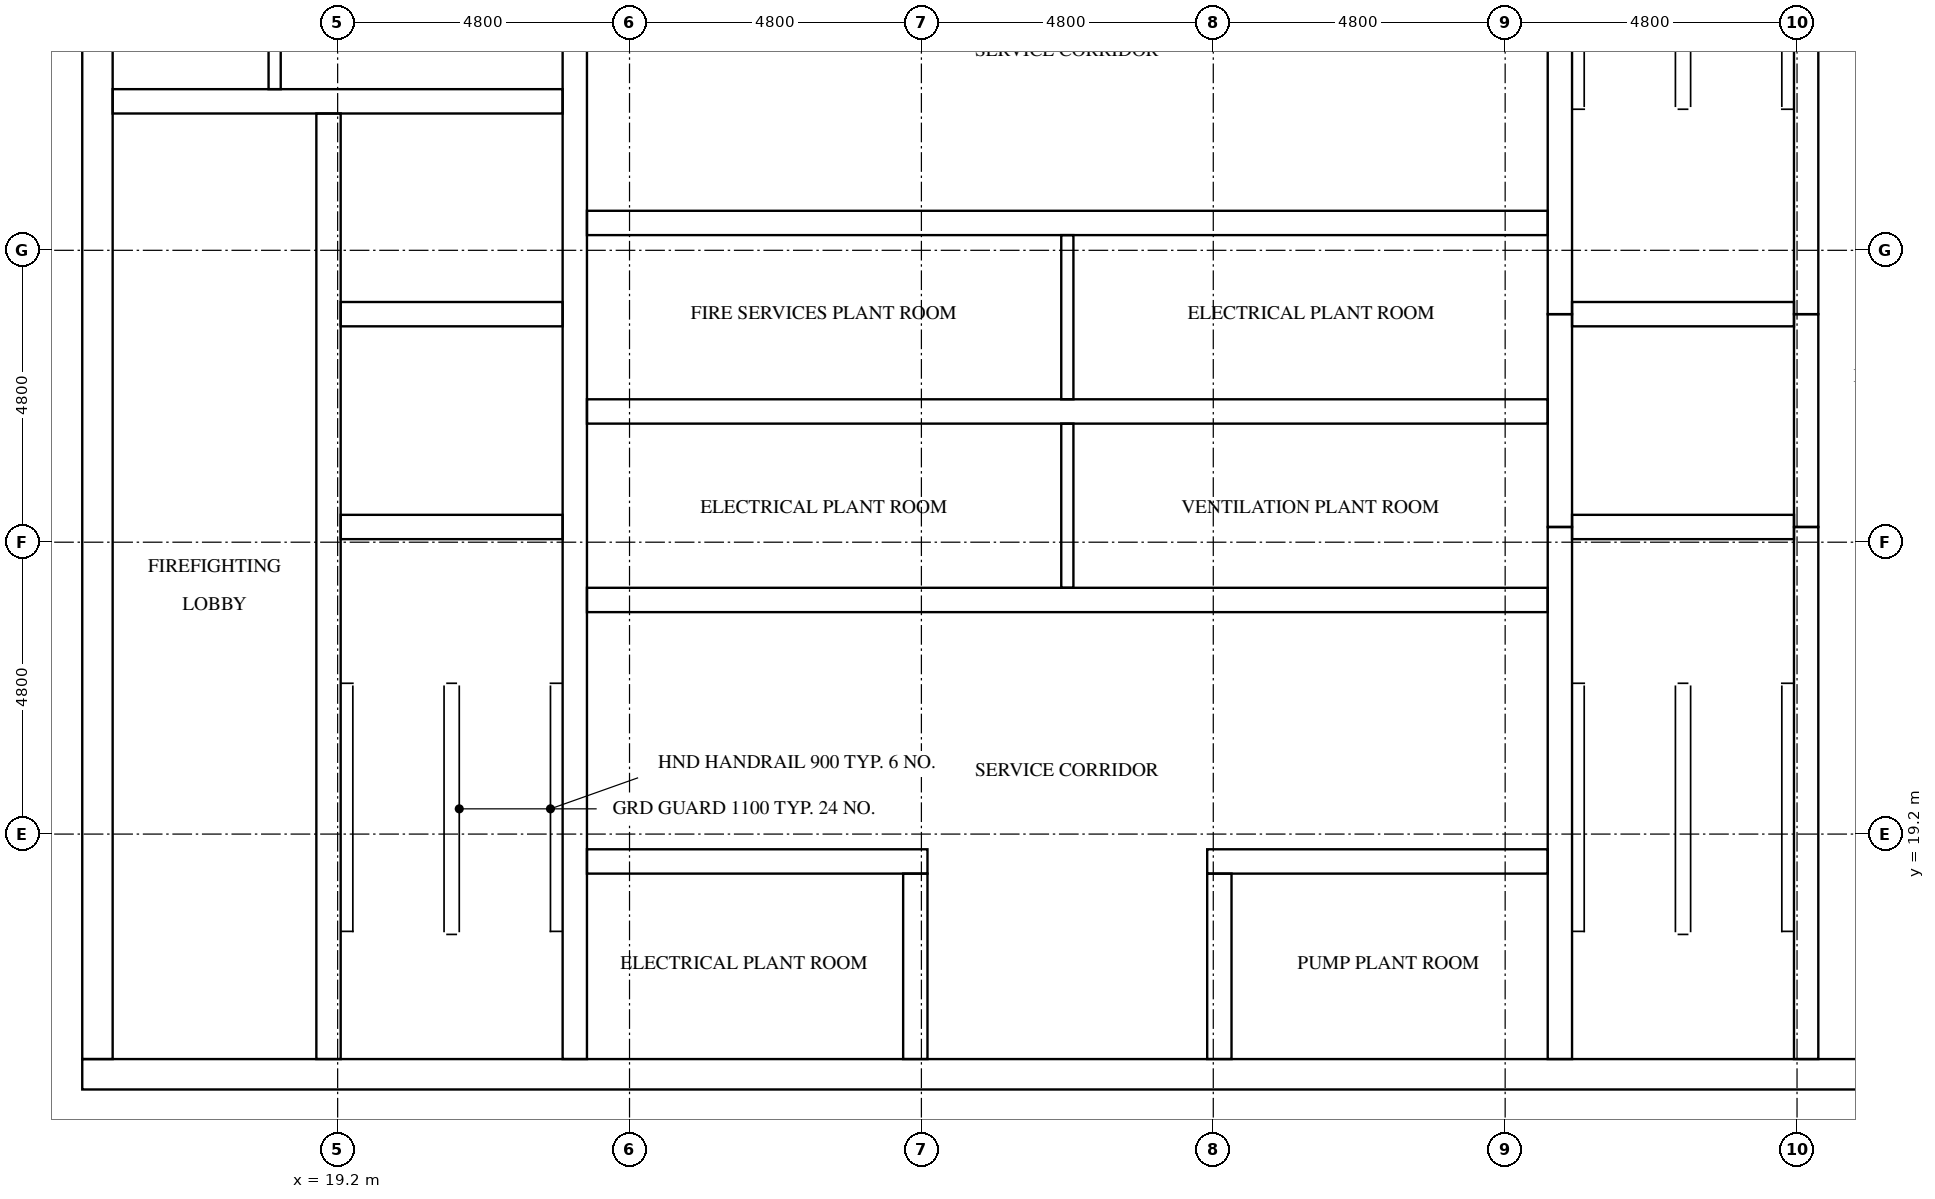
"""IFC4 building model, lengths in metres.
Left out: names, types, materials, properties, quantities, classifications, styles, units other than length and angle.
Written with IfcOpenShell. Run it as: python <this file> out.ifc"""

import sys

from ifc_helpers import new_model, si_unit, direction, frame, frame_2d, origin, place, context, subcontext, project, spatial, rectangle, extrude, element, fill, save


model = new_model("IFC4")
c1 = context("Model", 3, precision=1e-05, world=origin(), true_north=direction((0.0, 1.0)))
c2 = subcontext(c1, "Body", "Model", "MODEL_VIEW")
j1 = project(units=[si_unit("LENGTHUNIT", "METRE"), si_unit("PLANEANGLEUNIT", "RADIAN")], contexts=[c1])
p1 = place(None, origin())
s1 = spatial("IfcSite", under=j1, at=p1, CompositionType="ELEMENT")
p2 = place(p1, origin())
s2 = spatial("IfcBuilding", under=s1, at=p2, CompositionType="ELEMENT")
p3 = place(p2, frame((0.0, 0.0, 301.1)))
s3 = spatial("IfcBuildingStorey", under=s2, at=p3, CompositionType="ELEMENT", Elevation=301.1)
p4 = place(p3, frame((15.0, 15.25, 0.0), z_axis=(0.0, 0.0, 1.0), x_axis=(1.0, 0.0, 0.0)))
e1 = element("IfcWall", 1, at=p4, inside=s3, PredefinedType="SHEAR", context=c2, shape_type="SweptSolid", body=[
    extrude(rectangle(XDim=32.4, YDim=0.5, at=frame_2d((16.2, 0.0))), origin(), (0.0, 0.0, 1.0), 4.4),
])
p5 = place(p4, frame((15.3, 0.0, 0.0)))
e2 = element("IfcOpeningElement", 2, at=p5, cuts=e1, PredefinedType="OPENING", context=c2, shape_type="SweptSolid", body=[
    extrude(rectangle(XDim=1.8, YDim=2.1, at=frame_2d((0.9, 1.05))), frame((0.0, 0.26, 0.0), z_axis=(0.0, -1.0, 0.0), x_axis=(1.0, 0.0, 0.0)), (0.0, 0.0, 1.0), 0.52),
])
p6 = place(p3, frame((15.25, 15.5, 0.0), z_axis=(0.0, 0.0, 1.0), x_axis=(0.0, 1.0, 0.0)))
e3 = element("IfcWall", 3, at=p6, inside=s3, PredefinedType="SHEAR", context=c2, shape_type="SweptSolid", body=[
    extrude(rectangle(XDim=21.8, YDim=0.5, at=frame_2d((10.9, 0.0))), origin(), (0.0, 0.0, 1.0), 4.4),
])
p7 = place(p6, frame((5.26, 0.0, 0.0)))
e4 = element("IfcOpeningElement", 4, at=p7, cuts=e3, PredefinedType="OPENING", context=c2, shape_type="SweptSolid", body=[
    extrude(rectangle(XDim=1.2, YDim=2.1, at=frame_2d((0.6, 1.05))), frame((0.0, 0.26, 0.0), z_axis=(0.0, -1.0, 0.0), x_axis=(1.0, 0.0, 0.0)), (0.0, 0.0, 1.0), 0.52),
])
p8 = place(p3, frame((19.05, 15.5, 0.0), z_axis=(0.0, 0.0, 1.0), x_axis=(0.0, 1.0, 0.0)))
e5 = element("IfcWall", 5, at=p8, inside=s3, PredefinedType="SHEAR", context=c2, shape_type="SweptSolid", body=[
    extrude(rectangle(XDim=15.55, YDim=0.4, at=frame_2d((7.775, 0.0))), origin(), (0.0, 0.0, 1.0), 4.4),
])
p9 = place(p8, frame((9.95, 0.0, 0.0)))
e6 = element("IfcOpeningElement", 6, at=p9, cuts=e5, PredefinedType="OPENING", context=c2, shape_type="SweptSolid", body=[
    extrude(rectangle(XDim=1.1, YDim=2.1, at=frame_2d((0.55, 1.05))), frame((0.0, 0.21, 0.0), z_axis=(0.0, -1.0, 0.0), x_axis=(1.0, 0.0, 0.0)), (0.0, 0.0, 1.0), 0.42),
])
p10 = place(p8, frame((13.45, 0.0, 0.0)))
e7 = element("IfcOpeningElement", 7, at=p10, cuts=e5, PredefinedType="OPENING", context=c2, shape_type="SweptSolid", body=[
    extrude(rectangle(XDim=1.1, YDim=2.1, at=frame_2d((0.55, 1.05))), frame((0.0, 0.21, 0.0), z_axis=(0.0, -1.0, 0.0), x_axis=(1.0, 0.0, 0.0)), (0.0, 0.0, 1.0), 0.42),
])
p11 = place(p8, frame((0.7, 0.0, 0.0)))
e8 = element("IfcOpeningElement", 8, at=p11, cuts=e5, PredefinedType="OPENING", context=c2, shape_type="SweptSolid", body=[
    extrude(rectangle(XDim=1.2, YDim=2.1, at=frame_2d((0.6, 1.05))), frame((0.0, 0.21, 0.0), z_axis=(0.0, -1.0, 0.0), x_axis=(1.0, 0.0, 0.0)), (0.0, 0.0, 1.0), 0.42),
])
p12 = place(p3, frame((23.1, 15.5, 0.0), z_axis=(0.0, 0.0, 1.0), x_axis=(0.0, 1.0, 0.0)))
e9 = element("IfcWall", 9, at=p12, inside=s3, PredefinedType="SHEAR", context=c2, shape_type="SweptSolid", body=[
    extrude(rectangle(XDim=21.8, YDim=0.4, at=frame_2d((10.9, 0.0))), origin(), (0.0, 0.0, 1.0), 4.4),
])
p13 = place(p3, frame((39.3, 15.5, 0.0), z_axis=(0.0, 0.0, 1.0), x_axis=(0.0, 1.0, 0.0)))
e10 = element("IfcWall", 10, at=p13, inside=s3, PredefinedType="SHEAR", context=c2, shape_type="SweptSolid", body=[
    extrude(rectangle(XDim=8.75, YDim=0.4, at=frame_2d((4.375, 0.0))), origin(), (0.0, 0.0, 1.0), 4.4),
])
p14 = place(p3, frame((39.3, 24.25, 0.0), z_axis=(0.0, 0.0, 1.0), x_axis=(0.0, 1.0, 0.0)))
e11 = element("IfcWall", 11, at=p14, inside=s3, PredefinedType="SHEAR", context=c2, shape_type="SweptSolid", body=[
    extrude(rectangle(XDim=3.5, YDim=0.4, at=frame_2d((1.75, 0.0))), origin(), (0.0, 0.0, 1.0), 4.4),
])
p15 = place(p3, frame((39.3, 27.75, 0.0), z_axis=(0.0, 0.0, 1.0), x_axis=(0.0, 1.0, 0.0)))
e12 = element("IfcWall", 12, at=p15, inside=s3, PredefinedType="SHEAR", context=c2, shape_type="SweptSolid", body=[
    extrude(rectangle(XDim=9.55, YDim=0.4, at=frame_2d((4.775, 0.0))), origin(), (0.0, 0.0, 1.0), 4.4),
])
p16 = place(p3, frame((43.35, 15.5, 0.0), z_axis=(0.0, 0.0, 1.0), x_axis=(0.0, 1.0, 0.0)))
e13 = element("IfcWall", 13, at=p16, inside=s3, PredefinedType="SHEAR", context=c2, shape_type="SweptSolid", body=[
    extrude(rectangle(XDim=8.75, YDim=0.4, at=frame_2d((4.375, 0.0))), origin(), (0.0, 0.0, 1.0), 4.4),
])
p17 = place(p16, frame((0.7, 0.0, 0.0)))
e14 = element("IfcOpeningElement", 14, at=p17, cuts=e13, PredefinedType="OPENING", context=c2, shape_type="SweptSolid", body=[
    extrude(rectangle(XDim=1.2, YDim=2.1, at=frame_2d((0.6, 1.05))), frame((0.0, 0.21, 0.0), z_axis=(0.0, -1.0, 0.0), x_axis=(1.0, 0.0, 0.0)), (0.0, 0.0, 1.0), 0.42),
])
p18 = place(p3, frame((43.35, 24.25, 0.0), z_axis=(0.0, 0.0, 1.0), x_axis=(0.0, 1.0, 0.0)))
e15 = element("IfcWall", 15, at=p18, inside=s3, PredefinedType="SHEAR", context=c2, shape_type="SweptSolid", body=[
    extrude(rectangle(XDim=3.5, YDim=0.4, at=frame_2d((1.75, 0.0))), origin(), (0.0, 0.0, 1.0), 4.4),
])
p19 = place(p18, frame((1.2, 0.0, 0.0)))
e16 = element("IfcOpeningElement", 16, at=p19, cuts=e15, PredefinedType="OPENING", context=c2, shape_type="SweptSolid", body=[
    extrude(rectangle(XDim=1.1, YDim=2.1, at=frame_2d((0.55, 1.05))), frame((0.0, 0.21, 0.0), z_axis=(0.0, -1.0, 0.0), x_axis=(1.0, 0.0, 0.0)), (0.0, 0.0, 1.0), 0.42),
])
p20 = place(p3, frame((43.35, 27.75, 0.0), z_axis=(0.0, 0.0, 1.0), x_axis=(0.0, 1.0, 0.0)))
e17 = element("IfcWall", 17, at=p20, inside=s3, PredefinedType="SHEAR", context=c2, shape_type="SweptSolid", body=[
    extrude(rectangle(XDim=9.55, YDim=0.4, at=frame_2d((4.775, 0.0))), origin(), (0.0, 0.0, 1.0), 4.4),
])
p21 = place(p20, frame((7.65, 0.0, 0.0)))
e18 = element("IfcOpeningElement", 18, at=p21, cuts=e17, PredefinedType="OPENING", context=c2, shape_type="SweptSolid", body=[
    extrude(rectangle(XDim=1.2, YDim=2.1, at=frame_2d((0.6, 1.05))), frame((0.0, 0.21, 0.0), z_axis=(0.0, -1.0, 0.0), x_axis=(1.0, 0.0, 0.0)), (0.0, 0.0, 1.0), 0.42),
])
for number, where, z_axis, x_axis in (
    (19, (19.25, 24.25, 0.0), (0.0, 0.0, 1.0), (1.0, 0.0, 0.0)),
    (20, (19.25, 27.75, 0.0), (0.0, 0.0, 1.0), (1.0, 0.0, 0.0)),
):
    element("IfcWall", number, at=place(p3, frame(where, z_axis=z_axis, x_axis=x_axis)), inside=s3, PredefinedType="SHEAR", context=c2, shape_type="SweptSolid", body=[
        extrude(rectangle(XDim=3.65, YDim=0.4, at=frame_2d((1.825, 0.0))), origin(), (0.0, 0.0, 1.0), 4.4),
    ])
p22 = place(p3, frame((15.5, 31.25, 0.0), z_axis=(0.0, 0.0, 1.0), x_axis=(1.0, 0.0, 0.0)))
e21 = element("IfcWall", 21, at=p22, inside=s3, PredefinedType="SHEAR", context=c2, shape_type="SweptSolid", body=[
    extrude(rectangle(XDim=7.4, YDim=0.4, at=frame_2d((3.7, 0.0))), origin(), (0.0, 0.0, 1.0), 4.4),
])
for number, where, z_axis, x_axis in (
    (22, (39.5, 24.25, 0.0), (0.0, 0.0, 1.0), (1.0, 0.0, 0.0)),
    (23, (39.5, 27.75, 0.0), (0.0, 0.0, 1.0), (1.0, 0.0, 0.0)),
):
    element("IfcWall", number, at=place(p3, frame(where, z_axis=z_axis, x_axis=x_axis)), inside=s3, PredefinedType="SHEAR", context=c2, shape_type="SweptSolid", body=[
        extrude(rectangle(XDim=3.65, YDim=0.4, at=frame_2d((1.825, 0.0))), origin(), (0.0, 0.0, 1.0), 4.4),
    ])
p23 = place(p3, frame((23.3, 18.75, 0.0), z_axis=(0.0, 0.0, 1.0), x_axis=(1.0, 0.0, 0.0)))
e24 = element("IfcWall", 24, at=p23, inside=s3, PredefinedType="SHEAR", context=c2, shape_type="SweptSolid", body=[
    extrude(rectangle(XDim=5.6, YDim=0.4, at=frame_2d((2.8, 0.0))), origin(), (0.0, 0.0, 1.0), 4.4),
])
p24 = place(p23, frame((2.1, 0.0, 0.0)))
e25 = element("IfcOpeningElement", 25, at=p24, cuts=e24, PredefinedType="OPENING", context=c2, shape_type="SweptSolid", body=[
    extrude(rectangle(XDim=1.0, YDim=2.1, at=frame_2d((0.5, 1.05))), frame((0.0, 0.21, 0.0), z_axis=(0.0, -1.0, 0.0), x_axis=(1.0, 0.0, 0.0)), (0.0, 0.0, 1.0), 0.42),
])
p25 = place(p3, frame((33.5, 18.75, 0.0), z_axis=(0.0, 0.0, 1.0), x_axis=(1.0, 0.0, 0.0)))
e26 = element("IfcWall", 26, at=p25, inside=s3, PredefinedType="SHEAR", context=c2, shape_type="SweptSolid", body=[
    extrude(rectangle(XDim=5.6, YDim=0.4, at=frame_2d((2.8, 0.0))), origin(), (0.0, 0.0, 1.0), 4.4),
])
p26 = place(p25, frame((2.5, 0.0, 0.0)))
e27 = element("IfcOpeningElement", 27, at=p26, cuts=e26, PredefinedType="OPENING", context=c2, shape_type="SweptSolid", body=[
    extrude(rectangle(XDim=1.0, YDim=2.1, at=frame_2d((0.5, 1.05))), frame((0.0, 0.21, 0.0), z_axis=(0.0, -1.0, 0.0), x_axis=(1.0, 0.0, 0.0)), (0.0, 0.0, 1.0), 0.42),
])
p27 = place(p3, frame((23.3, 23.05, 0.0), z_axis=(0.0, 0.0, 1.0), x_axis=(1.0, 0.0, 0.0)))
e28 = element("IfcWall", 28, at=p27, inside=s3, PredefinedType="SHEAR", context=c2, shape_type="SweptSolid", body=[
    extrude(rectangle(XDim=15.8, YDim=0.4, at=frame_2d((7.9, 0.0))), origin(), (0.0, 0.0, 1.0), 4.4),
])
p28 = place(p27, frame((3.4, 0.0, 0.0)))
e29 = element("IfcOpeningElement", 29, at=p28, cuts=e28, PredefinedType="OPENING", context=c2, shape_type="SweptSolid", body=[
    extrude(rectangle(XDim=1.0, YDim=2.1, at=frame_2d((0.5, 1.05))), frame((0.0, 0.21, 0.0), z_axis=(0.0, -1.0, 0.0), x_axis=(1.0, 0.0, 0.0)), (0.0, 0.0, 1.0), 0.42),
])
p29 = place(p27, frame((11.4, 0.0, 0.0)))
e30 = element("IfcOpeningElement", 30, at=p29, cuts=e28, PredefinedType="OPENING", context=c2, shape_type="SweptSolid", body=[
    extrude(rectangle(XDim=1.0, YDim=2.1, at=frame_2d((0.5, 1.05))), frame((0.0, 0.21, 0.0), z_axis=(0.0, -1.0, 0.0), x_axis=(1.0, 0.0, 0.0)), (0.0, 0.0, 1.0), 0.42),
])
p30 = place(p3, frame((23.3, 26.15, 0.0), z_axis=(0.0, 0.0, 1.0), x_axis=(1.0, 0.0, 0.0)))
e31 = element("IfcWall", 31, at=p30, inside=s3, PredefinedType="SHEAR", context=c2, shape_type="SweptSolid", body=[
    extrude(rectangle(XDim=15.8, YDim=0.4, at=frame_2d((7.9, 0.0))), origin(), (0.0, 0.0, 1.0), 4.4),
])
p31 = place(p3, frame((23.3, 29.25, 0.0), z_axis=(0.0, 0.0, 1.0), x_axis=(1.0, 0.0, 0.0)))
e32 = element("IfcWall", 32, at=p31, inside=s3, PredefinedType="SHEAR", context=c2, shape_type="SweptSolid", body=[
    extrude(rectangle(XDim=15.8, YDim=0.4, at=frame_2d((7.9, 0.0))), origin(), (0.0, 0.0, 1.0), 4.4),
])
p32 = place(p31, frame((3.4, 0.0, 0.0)))
e33 = element("IfcOpeningElement", 33, at=p32, cuts=e32, PredefinedType="OPENING", context=c2, shape_type="SweptSolid", body=[
    extrude(rectangle(XDim=1.0, YDim=2.1, at=frame_2d((0.5, 1.05))), frame((0.0, 0.21, 0.0), z_axis=(0.0, -1.0, 0.0), x_axis=(1.0, 0.0, 0.0)), (0.0, 0.0, 1.0), 0.42),
])
p33 = place(p31, frame((11.4, 0.0, 0.0)))
e34 = element("IfcOpeningElement", 34, at=p33, cuts=e32, PredefinedType="OPENING", context=c2, shape_type="SweptSolid", body=[
    extrude(rectangle(XDim=1.0, YDim=2.1, at=frame_2d((0.5, 1.05))), frame((0.0, 0.21, 0.0), z_axis=(0.0, -1.0, 0.0), x_axis=(1.0, 0.0, 0.0)), (0.0, 0.0, 1.0), 0.42),
])
for number, where, z_axis, x_axis in (
    (35, (28.7, 15.5, 0.0), (0.0, 0.0, 1.0), (0.0, 1.0, 0.0)),
    (36, (33.7, 15.5, 0.0), (0.0, 0.0, 1.0), (0.0, 1.0, 0.0)),
):
    element("IfcWall", number, at=place(p3, frame(where, z_axis=z_axis, x_axis=x_axis)), inside=s3, PredefinedType="SHEAR", context=c2, shape_type="SweptSolid", body=[
        extrude(rectangle(XDim=3.05, YDim=0.4, at=frame_2d((1.525, 0.0))), origin(), (0.0, 0.0, 1.0), 4.4),
    ])
p34 = place(p3, frame((18.164, 31.45, 0.0), z_axis=(0.0, 0.0, 1.0), x_axis=(0.0, 1.0, 0.0)))
e37 = element("IfcWall", 37, at=p34, inside=s3, PredefinedType="PARTITIONING", context=c2, shape_type="SweptSolid", body=[
    extrude(rectangle(XDim=5.85, YDim=0.2, at=frame_2d((2.925, 0.0))), origin(), (0.0, 0.0, 1.0), 4.4),
])
for number, where, z_axis, x_axis in (
    (38, (31.2, 23.25, 0.0), (0.0, 0.0, 1.0), (0.0, 1.0, 0.0)),
    (39, (31.2, 26.35, 0.0), (0.0, 0.0, 1.0), (0.0, 1.0, 0.0)),
):
    element("IfcWall", number, at=place(p3, frame(where, z_axis=z_axis, x_axis=x_axis)), inside=s3, PredefinedType="PARTITIONING", context=c2, shape_type="SweptSolid", body=[
        extrude(rectangle(XDim=2.7, YDim=0.2, at=frame_2d((1.35, 0.0))), origin(), (0.0, 0.0, 1.0), 4.4),
    ])
p35 = place(p9, origin())
e40 = element("IfcDoor", 40, at=p35, inside=s3, OperationType="DOUBLE_DOOR_SLIDING", PredefinedType="DOOR", context=c2, shape_type="SweptSolid", body=[
    extrude(rectangle(XDim=1.1, YDim=2.1, at=frame_2d((0.55, 1.05))), frame((0.0, 0.025, 0.0), z_axis=(0.0, -1.0, 0.0), x_axis=(1.0, 0.0, 0.0)), (0.0, 0.0, 1.0), 0.05),
])
fill(e6, e40)
p36 = place(p10, origin())
e41 = element("IfcDoor", 41, at=p36, inside=s3, OperationType="DOUBLE_DOOR_SLIDING", PredefinedType="DOOR", context=c2, shape_type="SweptSolid", body=[
    extrude(rectangle(XDim=1.1, YDim=2.1, at=frame_2d((0.55, 1.05))), frame((0.0, 0.025, 0.0), z_axis=(0.0, -1.0, 0.0), x_axis=(1.0, 0.0, 0.0)), (0.0, 0.0, 1.0), 0.05),
])
fill(e7, e41)
p37 = place(p19, origin())
e42 = element("IfcDoor", 42, at=p37, inside=s3, OperationType="DOUBLE_DOOR_SLIDING", PredefinedType="DOOR", context=c2, shape_type="SweptSolid", body=[
    extrude(rectangle(XDim=1.1, YDim=2.1, at=frame_2d((0.55, 1.05))), frame((0.0, 0.025, 0.0), z_axis=(0.0, -1.0, 0.0), x_axis=(1.0, 0.0, 0.0)), (0.0, 0.0, 1.0), 0.05),
])
fill(e16, e42)
p38 = place(p11, frame((1.2, 0.0, 0.0), z_axis=(0.0, 0.0, 1.0), x_axis=(-1.0, 0.0, 0.0)))
e43 = element("IfcDoor", 43, at=p38, inside=s3, OperationType="SINGLE_SWING_RIGHT", PredefinedType="DOOR", context=c2, shape_type="SweptSolid", body=[
    extrude(rectangle(XDim=1.2, YDim=2.1, at=frame_2d((0.6, 1.05))), frame((0.0, 0.025, 0.0), z_axis=(0.0, -1.0, 0.0), x_axis=(1.0, 0.0, 0.0)), (0.0, 0.0, 1.0), 0.05),
])
fill(e8, e43)
p39 = place(p17, origin())
e44 = element("IfcDoor", 44, at=p39, inside=s3, OperationType="SINGLE_SWING_LEFT", PredefinedType="DOOR", context=c2, shape_type="SweptSolid", body=[
    extrude(rectangle(XDim=1.2, YDim=2.1, at=frame_2d((0.6, 1.05))), frame((0.0, 0.025, 0.0), z_axis=(0.0, -1.0, 0.0), x_axis=(1.0, 0.0, 0.0)), (0.0, 0.0, 1.0), 0.05),
])
fill(e14, e44)
p40 = place(p5, frame((1.8, 0.0, 0.0), z_axis=(0.0, 0.0, 1.0), x_axis=(-1.0, 0.0, 0.0)))
e45 = element("IfcDoor", 45, at=p40, inside=s3, OperationType="DOUBLE_DOOR_SINGLE_SWING", PredefinedType="DOOR", context=c2, shape_type="SweptSolid", body=[
    extrude(rectangle(XDim=1.8, YDim=2.1, at=frame_2d((0.9, 1.05))), frame((0.0, 0.025, 0.0), z_axis=(0.0, -1.0, 0.0), x_axis=(1.0, 0.0, 0.0)), (0.0, 0.0, 1.0), 0.05),
])
fill(e2, e45)
p41 = place(p7, frame((1.2, 0.0, 0.0), z_axis=(0.0, 0.0, 1.0), x_axis=(-1.0, 0.0, 0.0)))
e46 = element("IfcDoor", 46, at=p41, inside=s3, OperationType="SINGLE_SWING_LEFT", PredefinedType="DOOR", context=c2, shape_type="SweptSolid", body=[
    extrude(rectangle(XDim=1.2, YDim=2.1, at=frame_2d((0.6, 1.05))), frame((0.0, 0.025, 0.0), z_axis=(0.0, -1.0, 0.0), x_axis=(1.0, 0.0, 0.0)), (0.0, 0.0, 1.0), 0.05),
])
fill(e4, e46)
p42 = place(p28, frame((1.0, 0.0, 0.0), z_axis=(0.0, 0.0, 1.0), x_axis=(-1.0, 0.0, 0.0)))
e47 = element("IfcDoor", 47, at=p42, inside=s3, OperationType="SINGLE_SWING_LEFT", PredefinedType="DOOR", context=c2, shape_type="SweptSolid", body=[
    extrude(rectangle(XDim=1.0, YDim=2.1, at=frame_2d((0.5, 1.05))), frame((0.0, 0.025, 0.0), z_axis=(0.0, -1.0, 0.0), x_axis=(1.0, 0.0, 0.0)), (0.0, 0.0, 1.0), 0.05),
])
fill(e29, e47)
p43 = place(p29, frame((1.0, 0.0, 0.0), z_axis=(0.0, 0.0, 1.0), x_axis=(-1.0, 0.0, 0.0)))
e48 = element("IfcDoor", 48, at=p43, inside=s3, OperationType="SINGLE_SWING_RIGHT", PredefinedType="DOOR", context=c2, shape_type="SweptSolid", body=[
    extrude(rectangle(XDim=1.0, YDim=2.1, at=frame_2d((0.5, 1.05))), frame((0.0, 0.025, 0.0), z_axis=(0.0, -1.0, 0.0), x_axis=(1.0, 0.0, 0.0)), (0.0, 0.0, 1.0), 0.05),
])
fill(e30, e48)
p44 = place(p32, origin())
e49 = element("IfcDoor", 49, at=p44, inside=s3, OperationType="SINGLE_SWING_LEFT", PredefinedType="DOOR", context=c2, shape_type="SweptSolid", body=[
    extrude(rectangle(XDim=1.0, YDim=2.1, at=frame_2d((0.5, 1.05))), frame((0.0, 0.025, 0.0), z_axis=(0.0, -1.0, 0.0), x_axis=(1.0, 0.0, 0.0)), (0.0, 0.0, 1.0), 0.05),
])
fill(e33, e49)
p45 = place(p33, origin())
e50 = element("IfcDoor", 50, at=p45, inside=s3, OperationType="SINGLE_SWING_RIGHT", PredefinedType="DOOR", context=c2, shape_type="SweptSolid", body=[
    extrude(rectangle(XDim=1.0, YDim=2.1, at=frame_2d((0.5, 1.05))), frame((0.0, 0.025, 0.0), z_axis=(0.0, -1.0, 0.0), x_axis=(1.0, 0.0, 0.0)), (0.0, 0.0, 1.0), 0.05),
])
fill(e34, e50)
p46 = place(p24, origin())
e51 = element("IfcDoor", 51, at=p46, inside=s3, OperationType="SINGLE_SWING_LEFT", PredefinedType="DOOR", context=c2, shape_type="SweptSolid", body=[
    extrude(rectangle(XDim=1.0, YDim=2.1, at=frame_2d((0.5, 1.05))), frame((0.0, 0.025, 0.0), z_axis=(0.0, -1.0, 0.0), x_axis=(1.0, 0.0, 0.0)), (0.0, 0.0, 1.0), 0.05),
])
fill(e25, e51)
p47 = place(p26, origin())
e52 = element("IfcDoor", 52, at=p47, inside=s3, OperationType="SINGLE_SWING_RIGHT", PredefinedType="DOOR", context=c2, shape_type="SweptSolid", body=[
    extrude(rectangle(XDim=1.0, YDim=2.1, at=frame_2d((0.5, 1.05))), frame((0.0, 0.025, 0.0), z_axis=(0.0, -1.0, 0.0), x_axis=(1.0, 0.0, 0.0)), (0.0, 0.0, 1.0), 0.05),
])
fill(e27, e52)
save(model, sys.argv[1])
